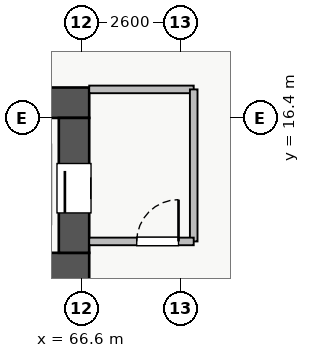
"""IFC4 building model, lengths in metres.
Left out: names, types, materials, properties, quantities, classifications, styles, units other than length and angle.
Written with IfcOpenShell. Run it as: python <this file> out.ifc"""

import sys

from ifc_helpers import new_model, si_unit, direction, frame, frame_2d, origin, place, context, subcontext, project, spatial, rectangle, extrude, source, transform, mapped, element, fill, save


model = new_model("IFC4")
c1 = context("Model", 3, precision=1e-05, world=origin(), true_north=direction((0.0, 1.0)))
c2 = subcontext(c1, "Body", "Model", "MODEL_VIEW")
j1 = project(units=[si_unit("LENGTHUNIT", "METRE"), si_unit("PLANEANGLEUNIT", "RADIAN")], contexts=[c1])
p1 = place(None, origin())
s1 = spatial("IfcSite", under=j1, at=p1, CompositionType="ELEMENT")
p2 = place(p1, origin())
s2 = spatial("IfcBuilding", under=s1, at=p2, CompositionType="ELEMENT")
p3 = place(p2, frame((0.0, 0.0, -9.6)))
s3 = spatial("IfcBuildingStorey", under=s2, at=p3, CompositionType="ELEMENT", Elevation=-9.6)
p4 = place(p3, frame((54.2, 12.45, 0.0), z_axis=(0.0, 0.0, 1.0), x_axis=(1.0, 0.0, 0.0)))
e1 = element("IfcWall", 1, at=p4, inside=s3, PredefinedType="SHEAR", context=c2, shape_type="SweptSolid", body=[
    extrude(rectangle(XDim=12.6, YDim=0.8, at=frame_2d((6.3, 0.0))), origin(), (0.0, 0.0, 1.0), 4.8),
])
p5 = place(p4, frame((8.2, 0.0, 0.0)))
e2 = element("IfcOpeningElement", 2, at=p5, cuts=e1, PredefinedType="OPENING", context=c2, shape_type="SweptSolid", body=[
    extrude(rectangle(XDim=1.1, YDim=2.05, at=frame_2d((0.55, 1.025))), frame((0.0, 0.41, 0.0), z_axis=(0.0, -1.0, 0.0), x_axis=(1.0, 0.0, 0.0)), (0.0, 0.0, 1.0), 0.82),
])
p6 = place(p3, frame((54.2, 16.8, 0.0), z_axis=(0.0, 0.0, 1.0), x_axis=(1.0, 0.0, 0.0)))
e3 = element("IfcWall", 3, at=p6, inside=s3, PredefinedType="SHEAR", context=c2, shape_type="SweptSolid", body=[
    extrude(rectangle(XDim=12.6, YDim=0.8, at=frame_2d((6.3, 0.0))), origin(), (0.0, 0.0, 1.0), 4.8),
])
p7 = place(p3, frame((66.4, 12.85, 0.0), z_axis=(0.0, 0.0, 1.0), x_axis=(0.0, 1.0, 0.0)))
e4 = element("IfcWall", 4, at=p7, inside=s3, PredefinedType="SHEAR", context=c2, shape_type="SweptSolid", body=[
    extrude(rectangle(XDim=3.55, YDim=0.8, at=frame_2d((1.775, 0.0))), origin(), (0.0, 0.0, 1.0), 4.8),
])
p8 = place(p7, frame((1.05, 0.0, 0.0)))
e5 = element("IfcOpeningElement", 5, at=p8, cuts=e4, PredefinedType="OPENING", context=c2, shape_type="SweptSolid", body=[
    extrude(rectangle(XDim=1.3, YDim=2.05, at=frame_2d((0.65, 1.025))), frame((0.0, 0.41, 0.0), z_axis=(0.0, -1.0, 0.0), x_axis=(1.0, 0.0, 0.0)), (0.0, 0.0, 1.0), 0.82),
])
p9 = place(p3, frame((66.8, 17.15, 0.0), z_axis=(0.0, 0.0, 1.0), x_axis=(1.0, 0.0, 0.0)))
e6 = element("IfcWall", 6, at=p9, inside=s3, PredefinedType="PARTITIONING", context=c2, shape_type="SweptSolid", body=[
    extrude(rectangle(XDim=2.75, YDim=0.2, at=frame_2d((1.375, 0.0))), origin(), (0.0, 0.0, 1.0), 4.58),
])
p10 = place(p3, frame((69.55, 13.15, 0.0), z_axis=(0.0, 0.0, 1.0), x_axis=(0.0, 1.0, 0.0)))
e7 = element("IfcWall", 7, at=p10, inside=s3, PredefinedType="PARTITIONING", context=c2, shape_type="SweptSolid", body=[
    extrude(rectangle(XDim=4.0, YDim=0.2, at=frame_2d((2.0, 0.0))), origin(), (0.0, 0.0, 1.0), 4.58),
])
p11 = place(p3, frame((66.8, 13.15, 0.0), z_axis=(0.0, 0.0, 1.0), x_axis=(1.0, 0.0, 0.0)))
e8 = element("IfcWall", 8, at=p11, inside=s3, PredefinedType="PARTITIONING", context=c2, shape_type="SweptSolid", body=[
    extrude(rectangle(XDim=2.75, YDim=0.2, at=frame_2d((1.375, 0.0))), origin(), (0.0, 0.0, 1.0), 4.58),
])
p12 = place(p11, frame((1.25, 0.0, 0.0)))
e9 = element("IfcOpeningElement", 9, at=p12, cuts=e8, PredefinedType="OPENING", context=c2, shape_type="SweptSolid", body=[
    extrude(rectangle(XDim=1.1, YDim=2.05, at=frame_2d((0.55, 1.025))), frame((0.0, 0.11, 0.0), z_axis=(0.0, -1.0, 0.0), x_axis=(1.0, 0.0, 0.0)), (0.0, 0.0, 1.0), 0.22),
])
m1 = source(origin(), c2, "Body", "SweptSolid", [
    extrude(rectangle(XDim=1.3, YDim=2.05, at=frame_2d((0.65, 1.025))), frame((0.0, 0.025, 0.0), z_axis=(0.0, -1.0, 0.0), x_axis=(1.0, 0.0, 0.0)), (0.0, 0.0, 1.0), 0.05),
])
p13 = place(p8, origin())
e10 = element("IfcDoor", 10, at=p13, inside=s3, OperationType="SLIDING_TO_RIGHT", PredefinedType="DOOR", context=c2, shape_type="MappedRepresentation", body=[
    mapped(m1, transform((0.0, 0.0, 0.0), x_axis=(1.0, 0.0, 0.0), y_axis=(0.0, 1.0, 0.0), z_axis=(0.0, 0.0, 1.0), scale=1.0)),
])
fill(e5, e10)
m2 = source(origin(), c2, "Body", "SweptSolid", [
    extrude(rectangle(XDim=1.1, YDim=2.05, at=frame_2d((0.55, 1.025))), frame((0.0, 0.025, 0.0), z_axis=(0.0, -1.0, 0.0), x_axis=(1.0, 0.0, 0.0)), (0.0, 0.0, 1.0), 0.05),
])
p14 = place(p12, origin())
e11 = element("IfcDoor", 11, at=p14, inside=s3, OperationType="SINGLE_SWING_RIGHT", PredefinedType="DOOR", context=c2, shape_type="MappedRepresentation", body=[
    mapped(m2, transform((0.0, 0.0, 0.0), x_axis=(1.0, 0.0, 0.0), y_axis=(0.0, 1.0, 0.0), z_axis=(0.0, 0.0, 1.0), scale=1.0)),
])
fill(e9, e11)
save(model, sys.argv[1])
